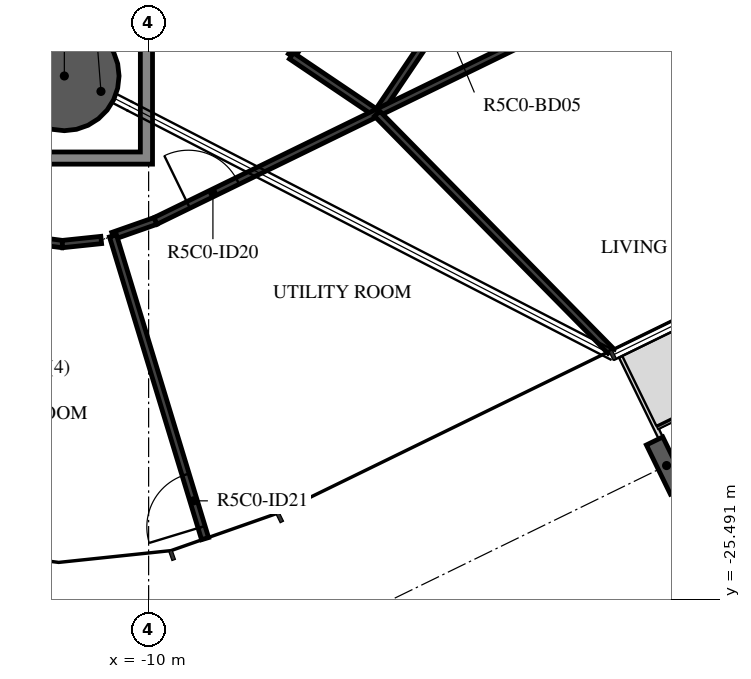
"""IFC4 building model, lengths in metres.
Left out: names, types, materials, properties, quantities, classifications, styles, units other than length and angle.
Written with IfcOpenShell. Run it as: python <this file> out.ifc"""

import sys

from ifc_helpers import new_model, si_unit, direction, frame, frame_2d, origin, origin_2d, place, context, subcontext, project, spatial, polyline, rectangle, hollow_circle, i_section, outline, extrude, element, fill, save


model = new_model("IFC4")
c1 = context("Model", 3, precision=1e-05, world=origin(), true_north=direction((0.0, 1.0)))
c2 = subcontext(c1, "Body", "Model", "MODEL_VIEW")
j1 = project(units=[si_unit("LENGTHUNIT", "METRE"), si_unit("PLANEANGLEUNIT", "RADIAN")], contexts=[c1])
p1 = place(None, origin())
s1 = spatial("IfcSite", under=j1, at=p1, CompositionType="ELEMENT")
p2 = place(p1, origin())
s2 = spatial("IfcBuilding", under=s1, at=p2, CompositionType="ELEMENT")
p3 = place(p2, frame((0.0, 0.0, 209.4)))
s3 = spatial("IfcBuildingStorey", under=s2, at=p3, CompositionType="ELEMENT", Elevation=209.4)
p4 = place(p3, frame((-11.386, -16.881, -0.38), z_axis=(0.0, 0.0, 1.0), x_axis=(1.0, 0.0, 0.0)))
e1 = element("IfcColumn", 1, at=p4, inside=s3, PredefinedType="COLUMN", context=c2, shape_type="SweptSolid", body=[
    extrude(hollow_circle(Radius=0.9, WallThickness=0.04, at=origin_2d()), origin(), (0.0, 0.0, 1.0), 3.5),
])
p5 = place(p3, frame((-1.482, -23.287, -0.38), z_axis=(0.0, 0.0, 1.0), x_axis=(-0.898794095235, -0.438371046456, 0.0)))
e2 = element("IfcColumn", 2, at=p5, inside=s3, PredefinedType="COLUMN", context=c2, shape_type="SweptSolid", body=[
    extrude(i_section(OverallWidth=0.3, OverallDepth=0.9, WebThickness=0.019, FlangeThickness=0.035, FilletRadius=0.03, at=origin_2d()), origin(), (0.0, 0.0, 1.0), 3.5),
])
p6 = place(p3, frame((-5.918, -13.981, 0.0), z_axis=(0.0, 0.0, 1.0), x_axis=(-0.559254999968, -0.828995684555, 0.0)))
e3 = element("IfcWall", 3, at=p6, inside=s3, PredefinedType="PARTITIONING", context=c2, shape_type="SweptSolid", body=[
    extrude(rectangle(XDim=3.099, YDim=0.12, at=frame_2d((1.55, 0.0))), origin(), (0.0, 0.0, 1.0), 3.12),
])
p7 = place(p3, frame((-7.652, -16.55, 0.0), z_axis=(0.0, 0.0, 1.0), x_axis=(0.829053397483, -0.559169441334, 0.0)))
e4 = element("IfcWall", 4, at=p7, inside=s3, PredefinedType="PARTITIONING", context=c2, shape_type="SweptSolid", body=[
    extrude(rectangle(XDim=1.686, YDim=0.12, at=frame_2d((0.843, 0.0))), origin(), (0.0, 0.0, 1.0), 3.12),
])
p8 = place(p3, frame((-6.229, -17.48, 0.0), z_axis=(0.0, 0.0, 1.0), x_axis=(0.559206483048, 0.829028412853, 0.0)))
e5 = element("IfcWall", 5, at=p8, inside=s3, PredefinedType="PARTITIONING", context=c2, shape_type="SweptSolid", body=[
    extrude(rectangle(XDim=3.432, YDim=0.12, at=frame_2d((1.716, 0.0))), origin(), (0.0, 0.0, 1.0), 3.12),
])
p9 = place(p8, frame((1.5, 0.0, 0.0)))
e6 = element("IfcOpeningElement", 6, at=p9, cuts=e5, PredefinedType="OPENING", context=c2, shape_type="SweptSolid", body=[
    extrude(rectangle(XDim=0.8, YDim=2.1, at=frame_2d((0.4, 1.05))), frame((0.0, 0.07, 0.0), z_axis=(0.0, -1.0, 0.0), x_axis=(1.0, 0.0, 0.0)), (0.0, 0.0, 1.0), 0.14),
])
p10 = place(p3, frame((-12.055, -19.563, 0.0), z_axis=(0.0, 0.0, 1.0), x_axis=(0.991802759529, -0.127778269633, 0.0)))
e7 = element("IfcWall", 7, at=p10, inside=s3, PredefinedType="PARTITIONING", context=c2, shape_type="SweptSolid", body=[
    extrude(rectangle(XDim=0.642, YDim=0.12, at=frame_2d((0.321, 0.0))), origin(), (0.0, 0.0, 1.0), 3.12),
])
p11 = place(p3, frame((-11.418, -19.645, 0.0), z_axis=(0.0, 0.0, 1.0), x_axis=(0.994515867502, 0.104585798686, 0.0)))
e8 = element("IfcWall", 8, at=p11, inside=s3, PredefinedType="PARTITIONING", context=c2, shape_type="SweptSolid", body=[
    extrude(rectangle(XDim=0.642, YDim=0.12, at=frame_2d((0.321, 0.0))), origin(), (0.0, 0.0, 1.0), 3.12),
])
p12 = place(p3, frame((-10.586, -19.51, 0.0), z_axis=(0.0, 0.0, 1.0), x_axis=(0.943560277016, 0.3312008509, 0.0)))
e9 = element("IfcWall", 9, at=p12, inside=s3, PredefinedType="PARTITIONING", context=c2, shape_type="SweptSolid", body=[
    extrude(rectangle(XDim=0.741, YDim=0.12, at=frame_2d((0.371, 0.0))), origin(), (0.0, 0.0, 1.0), 3.12),
])
p13 = place(p3, frame((-9.886, -19.264, 0.0), z_axis=(0.0, 0.0, 1.0), x_axis=(0.898796326112, 0.43836647245, 0.0)))
e10 = element("IfcWall", 10, at=p13, inside=s3, PredefinedType="PARTITIONING", context=c2, shape_type="SweptSolid", body=[
    extrude(rectangle(XDim=10.014, YDim=0.12, at=frame_2d((5.007, 0.0))), origin(), (0.0, 0.0, 1.0), 3.12),
])
p14 = place(p13, frame((0.6, 0.0, 0.0)))
e11 = element("IfcOpeningElement", 11, at=p14, cuts=e10, PredefinedType="OPENING", context=c2, shape_type="SweptSolid", body=[
    extrude(rectangle(XDim=0.9, YDim=2.1, at=frame_2d((0.45, 1.05))), frame((0.0, 0.07, 0.0), z_axis=(0.0, -1.0, 0.0), x_axis=(1.0, 0.0, 0.0)), (0.0, 0.0, 1.0), 0.14),
])
p15 = place(p3, frame((-9.072, -24.489, 0.0), z_axis=(0.0, 0.0, 1.0), x_axis=(-0.291025348593, 0.956715342449, 0.0)))
e12 = element("IfcWall", 12, at=p15, inside=s3, PredefinedType="PARTITIONING", context=c2, shape_type="SweptSolid", body=[
    extrude(rectangle(XDim=5.205, YDim=0.12, at=frame_2d((2.602, 0.0))), origin(), (0.0, 0.0, 1.0), 3.12),
])
p16 = place(p15, frame((0.2, 0.0, 0.0)))
e13 = element("IfcOpeningElement", 13, at=p16, cuts=e12, PredefinedType="OPENING", context=c2, shape_type="SweptSolid", body=[
    extrude(rectangle(XDim=0.9, YDim=2.1, at=frame_2d((0.45, 1.05))), frame((0.0, 0.07, 0.0), z_axis=(0.0, -1.0, 0.0), x_axis=(1.0, 0.0, 0.0)), (0.0, 0.0, 1.0), 0.14),
])
p17 = place(p3, frame((-2.403, -21.4, 0.0), z_axis=(0.0, 0.0, 1.0), x_axis=(-0.70162063199, 0.712550692067, 0.0)))
e14 = element("IfcWall", 14, at=p17, inside=s3, PredefinedType="PARTITIONING", context=c2, shape_type="SweptSolid", body=[
    extrude(rectangle(XDim=5.472, YDim=0.12, at=frame_2d((2.736, 0.0))), origin(), (0.0, 0.0, 1.0), 3.12),
])
p18 = place(p3, origin())
e15 = element("IfcWall", 15, at=p18, inside=s3, PredefinedType="STANDARD", context=c2, shape_type="SweptSolid", body=[
    extrude(outline(polyline([(-9.936, -15.43), (-9.936, -18.331), (-12.836, -18.331), (-12.836, -15.43), (-9.936, -15.43)]), holes=[polyline([(-12.636, -18.131), (-10.136, -18.131), (-10.136, -15.631), (-12.636, -15.631), (-12.636, -18.131)])]), origin(), (0.0, 0.0, 1.0), 3.12),
])
p19 = place(p14, origin())
e16 = element("IfcDoor", 16, at=p19, inside=s3, OperationType="SINGLE_SWING_LEFT", PredefinedType="DOOR", context=c2, shape_type="SweptSolid", body=[
    extrude(rectangle(XDim=0.9, YDim=2.1, at=frame_2d((0.45, 1.05))), frame((0.0, 0.025, 0.0), z_axis=(0.0, -1.0, 0.0), x_axis=(1.0, 0.0, 0.0)), (0.0, 0.0, 1.0), 0.05),
])
fill(e11, e16)
p20 = place(p16, origin())
e17 = element("IfcDoor", 17, at=p20, inside=s3, OperationType="SINGLE_SWING_LEFT", PredefinedType="DOOR", context=c2, shape_type="SweptSolid", body=[
    extrude(rectangle(XDim=0.9, YDim=2.1, at=frame_2d((0.45, 1.05))), frame((0.0, 0.025, 0.0), z_axis=(0.0, -1.0, 0.0), x_axis=(1.0, 0.0, 0.0)), (0.0, 0.0, 1.0), 0.05),
])
fill(e13, e17)
save(model, sys.argv[1])
